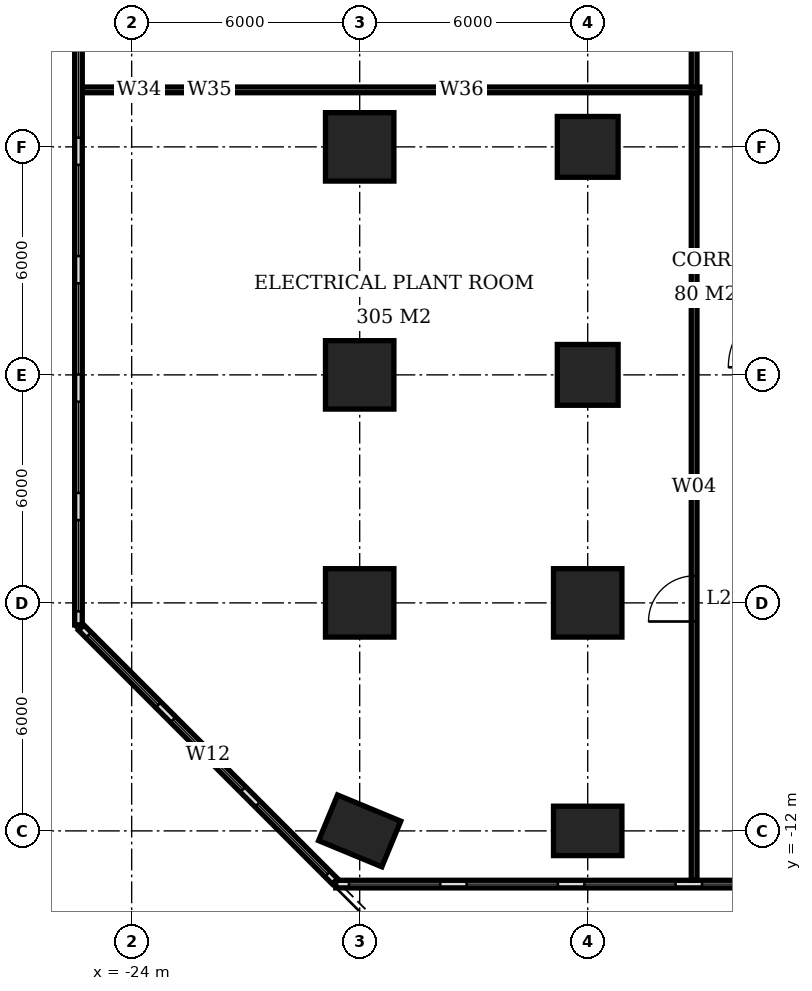
"""IFC4 building model, lengths in metres.
Left out: names, types, materials, properties, quantities, classifications, styles, units other than length and angle.
Written with IfcOpenShell. Run it as: python <this file> out.ifc"""

import sys

from ifc_helpers import new_model, si_unit, direction, frame, frame_2d, origin, origin_2d, place, context, subcontext, project, spatial, rectangle, extrude, element, fill, save


model = new_model("IFC4")
c1 = context("Model", 3, precision=1e-05, world=origin(), true_north=direction((0.0, 1.0)))
c2 = subcontext(c1, "Body", "Model", "MODEL_VIEW")
j1 = project(units=[si_unit("LENGTHUNIT", "METRE"), si_unit("PLANEANGLEUNIT", "RADIAN")], contexts=[c1])
p1 = place(None, origin())
s1 = spatial("IfcSite", under=j1, at=p1, CompositionType="ELEMENT")
p2 = place(p1, origin())
s2 = spatial("IfcBuilding", under=s1, at=p2, CompositionType="ELEMENT")
p3 = place(p2, frame((0.0, 0.0, 88.4)))
s3 = spatial("IfcBuildingStorey", under=s2, at=p3, CompositionType="ELEMENT", Elevation=88.4)
p4 = place(p3, frame((-18.0, -12.0, 0.0), z_axis=(0.0, 0.0, 1.0), x_axis=(-0.923879532511, 0.382683432365, 0.0)))
e1 = element("IfcColumn", 1, at=p4, inside=s3, PredefinedType="COLUMN", context=c2, shape_type="SweptSolid", body=[
    extrude(rectangle(XDim=1.8, YDim=1.3, at=origin_2d()), origin(), (0.0, 0.0, 1.0), 5.4),
])
for number, where, z_axis, x_axis in (
    (2, (-18.0, -6.0, 0.0), (0.0, 0.0, 1.0), (1.0, 0.0, 0.0)),
    (3, (-18.0, 0.0, 0.0), (0.0, 0.0, 1.0), (1.0, 0.0, 0.0)),
    (4, (-18.0, 6.0, 0.0), (0.0, 0.0, 1.0), (1.0, 0.0, 0.0)),
):
    element("IfcColumn", number, at=place(p3, frame(where, z_axis=z_axis, x_axis=x_axis)), inside=s3, PredefinedType="COLUMN", context=c2, shape_type="SweptSolid", body=[
        extrude(rectangle(XDim=1.8, YDim=1.8, at=origin_2d()), origin(), (0.0, 0.0, 1.0), 5.4),
    ])
p5 = place(p3, frame((-12.0, -12.0, 0.0), z_axis=(0.0, 0.0, 1.0), x_axis=(1.0, 0.0, 0.0)))
e5 = element("IfcColumn", 5, at=p5, inside=s3, PredefinedType="COLUMN", context=c2, shape_type="SweptSolid", body=[
    extrude(rectangle(XDim=1.8, YDim=1.3, at=origin_2d()), origin(), (0.0, 0.0, 1.0), 5.4),
])
p6 = place(p3, frame((-12.0, -6.0, 0.0), z_axis=(0.0, 0.0, 1.0), x_axis=(1.0, 0.0, 0.0)))
e6 = element("IfcColumn", 6, at=p6, inside=s3, PredefinedType="COLUMN", context=c2, shape_type="SweptSolid", body=[
    extrude(rectangle(XDim=1.8, YDim=1.8, at=origin_2d()), origin(), (0.0, 0.0, 1.0), 5.4),
])
for number, where, z_axis, x_axis in (
    (7, (-12.0, 0.0, 0.0), (0.0, 0.0, 1.0), (1.0, 0.0, 0.0)),
    (8, (-12.0, 6.0, 0.0), (0.0, 0.0, 1.0), (1.0, 0.0, 0.0)),
):
    element("IfcColumn", number, at=place(p3, frame(where, z_axis=z_axis, x_axis=x_axis)), inside=s3, PredefinedType="COLUMN", context=c2, shape_type="SweptSolid", body=[
        extrude(rectangle(XDim=1.6, YDim=1.6, at=origin_2d()), origin(), (0.0, 0.0, 1.0), 5.4),
    ])
p7 = place(p3, frame((-18.63, -13.4, 0.0), z_axis=(0.0, 0.0, 1.0), x_axis=(1.0, 0.0, 0.0)))
e9 = element("IfcWall", 9, at=p7, inside=s3, PredefinedType="USERDEFINED", context=c2, shape_type="SweptSolid", body=[
    extrude(rectangle(XDim=37.26, YDim=0.2, at=frame_2d((18.63, 0.0))), origin(), (0.0, 0.0, 1.0), 5.4),
])
p8 = place(p7, frame((0.348, 0.0, 0.6)))
e10 = element("IfcOpeningElement", 10, at=p8, cuts=e9, PredefinedType="OPENING", context=c2, shape_type="SweptSolid", body=[
    extrude(rectangle(XDim=2.4, YDim=3.0, at=frame_2d((1.2, 1.5))), frame((0.0, 0.11, 0.0), z_axis=(0.0, -1.0, 0.0), x_axis=(1.0, 0.0, 0.0)), (0.0, 0.0, 1.0), 0.22),
])
p9 = place(p7, frame((3.445, 0.0, 0.6)))
e11 = element("IfcOpeningElement", 11, at=p9, cuts=e9, PredefinedType="OPENING", context=c2, shape_type="SweptSolid", body=[
    extrude(rectangle(XDim=2.4, YDim=3.0, at=frame_2d((1.2, 1.5))), frame((0.0, 0.11, 0.0), z_axis=(0.0, -1.0, 0.0), x_axis=(1.0, 0.0, 0.0)), (0.0, 0.0, 1.0), 0.22),
])
p10 = place(p7, frame((6.542, 0.0, 0.6)))
e12 = element("IfcOpeningElement", 12, at=p10, cuts=e9, PredefinedType="OPENING", context=c2, shape_type="SweptSolid", body=[
    extrude(rectangle(XDim=2.4, YDim=3.0, at=frame_2d((1.2, 1.5))), frame((0.0, 0.11, 0.0), z_axis=(0.0, -1.0, 0.0), x_axis=(1.0, 0.0, 0.0)), (0.0, 0.0, 1.0), 0.22),
])
p11 = place(p7, frame((9.638, 0.0, 0.6)))
e13 = element("IfcOpeningElement", 13, at=p11, cuts=e9, PredefinedType="OPENING", context=c2, shape_type="SweptSolid", body=[
    extrude(rectangle(XDim=2.4, YDim=3.0, at=frame_2d((1.2, 1.5))), frame((0.0, 0.11, 0.0), z_axis=(0.0, -1.0, 0.0), x_axis=(1.0, 0.0, 0.0)), (0.0, 0.0, 1.0), 0.22),
])
p12 = place(p7, frame((12.735, 0.0, 0.6)))
e14 = element("IfcOpeningElement", 14, at=p12, cuts=e9, PredefinedType="OPENING", context=c2, shape_type="SweptSolid", body=[
    extrude(rectangle(XDim=2.4, YDim=3.0, at=frame_2d((1.2, 1.5))), frame((0.0, 0.11, 0.0), z_axis=(0.0, -1.0, 0.0), x_axis=(1.0, 0.0, 0.0)), (0.0, 0.0, 1.0), 0.22),
])
p13 = place(p7, frame((16.582, 0.0, 0.0)))
e15 = element("IfcOpeningElement", 15, at=p13, cuts=e9, PredefinedType="OPENING", context=c2, shape_type="SweptSolid", body=[
    extrude(rectangle(XDim=1.0, YDim=2.1, at=frame_2d((0.5, 1.05))), frame((0.0, 0.11, 0.0), z_axis=(0.0, -1.0, 0.0), x_axis=(1.0, 0.0, 0.0)), (0.0, 0.0, 1.0), 0.22),
])
p14 = place(p7, frame((18.928, 0.0, 0.6)))
e16 = element("IfcOpeningElement", 16, at=p14, cuts=e9, PredefinedType="OPENING", context=c2, shape_type="SweptSolid", body=[
    extrude(rectangle(XDim=2.4, YDim=3.0, at=frame_2d((1.2, 1.5))), frame((0.0, 0.11, 0.0), z_axis=(0.0, -1.0, 0.0), x_axis=(1.0, 0.0, 0.0)), (0.0, 0.0, 1.0), 0.22),
])
p15 = place(p7, frame((22.025, 0.0, 0.6)))
e17 = element("IfcOpeningElement", 17, at=p15, cuts=e9, PredefinedType="OPENING", context=c2, shape_type="SweptSolid", body=[
    extrude(rectangle(XDim=2.4, YDim=3.0, at=frame_2d((1.2, 1.5))), frame((0.0, 0.11, 0.0), z_axis=(0.0, -1.0, 0.0), x_axis=(1.0, 0.0, 0.0)), (0.0, 0.0, 1.0), 0.22),
])
p16 = place(p7, frame((25.122, 0.0, 0.6)))
e18 = element("IfcOpeningElement", 18, at=p16, cuts=e9, PredefinedType="OPENING", context=c2, shape_type="SweptSolid", body=[
    extrude(rectangle(XDim=2.4, YDim=3.0, at=frame_2d((1.2, 1.5))), frame((0.0, 0.11, 0.0), z_axis=(0.0, -1.0, 0.0), x_axis=(1.0, 0.0, 0.0)), (0.0, 0.0, 1.0), 0.22),
])
p17 = place(p7, frame((28.218, 0.0, 0.6)))
e19 = element("IfcOpeningElement", 19, at=p17, cuts=e9, PredefinedType="OPENING", context=c2, shape_type="SweptSolid", body=[
    extrude(rectangle(XDim=2.4, YDim=3.0, at=frame_2d((1.2, 1.5))), frame((0.0, 0.11, 0.0), z_axis=(0.0, -1.0, 0.0), x_axis=(1.0, 0.0, 0.0)), (0.0, 0.0, 1.0), 0.22),
])
p18 = place(p7, frame((31.315, 0.0, 0.6)))
e20 = element("IfcOpeningElement", 20, at=p18, cuts=e9, PredefinedType="OPENING", context=c2, shape_type="SweptSolid", body=[
    extrude(rectangle(XDim=2.4, YDim=3.0, at=frame_2d((1.2, 1.5))), frame((0.0, 0.11, 0.0), z_axis=(0.0, -1.0, 0.0), x_axis=(1.0, 0.0, 0.0)), (0.0, 0.0, 1.0), 0.22),
])
p19 = place(p7, frame((34.412, 0.0, 0.6)))
e21 = element("IfcOpeningElement", 21, at=p19, cuts=e9, PredefinedType="OPENING", context=c2, shape_type="SweptSolid", body=[
    extrude(rectangle(XDim=2.4, YDim=3.0, at=frame_2d((1.2, 1.5))), frame((0.0, 0.11, 0.0), z_axis=(0.0, -1.0, 0.0), x_axis=(1.0, 0.0, 0.0)), (0.0, 0.0, 1.0), 0.22),
])
p20 = place(p3, frame((-25.4, 24.58, 0.0), z_axis=(0.0, 0.0, 1.0), x_axis=(0.0, -1.0, 0.0)))
e22 = element("IfcWall", 22, at=p20, inside=s3, PredefinedType="USERDEFINED", context=c2, shape_type="SweptSolid", body=[
    extrude(rectangle(XDim=31.16, YDim=0.2, at=frame_2d((15.58, 0.0))), origin(), (0.0, 0.0, 1.0), 5.4),
])
p21 = place(p20, frame((0.358, 0.0, 0.6)))
e23 = element("IfcOpeningElement", 23, at=p21, cuts=e22, PredefinedType="OPENING", context=c2, shape_type="SweptSolid", body=[
    extrude(rectangle(XDim=2.4, YDim=3.0, at=frame_2d((1.2, 1.5))), frame((0.0, 0.11, 0.0), z_axis=(0.0, -1.0, 0.0), x_axis=(1.0, 0.0, 0.0)), (0.0, 0.0, 1.0), 0.22),
])
p22 = place(p20, frame((3.474, 0.0, 0.6)))
e24 = element("IfcOpeningElement", 24, at=p22, cuts=e22, PredefinedType="OPENING", context=c2, shape_type="SweptSolid", body=[
    extrude(rectangle(XDim=2.4, YDim=3.0, at=frame_2d((1.2, 1.5))), frame((0.0, 0.11, 0.0), z_axis=(0.0, -1.0, 0.0), x_axis=(1.0, 0.0, 0.0)), (0.0, 0.0, 1.0), 0.22),
])
p23 = place(p20, frame((6.59, 0.0, 0.6)))
e25 = element("IfcOpeningElement", 25, at=p23, cuts=e22, PredefinedType="OPENING", context=c2, shape_type="SweptSolid", body=[
    extrude(rectangle(XDim=2.4, YDim=3.0, at=frame_2d((1.2, 1.5))), frame((0.0, 0.11, 0.0), z_axis=(0.0, -1.0, 0.0), x_axis=(1.0, 0.0, 0.0)), (0.0, 0.0, 1.0), 0.22),
])
p24 = place(p20, frame((9.706, 0.0, 0.6)))
e26 = element("IfcOpeningElement", 26, at=p24, cuts=e22, PredefinedType="OPENING", context=c2, shape_type="SweptSolid", body=[
    extrude(rectangle(XDim=2.4, YDim=3.0, at=frame_2d((1.2, 1.5))), frame((0.0, 0.11, 0.0), z_axis=(0.0, -1.0, 0.0), x_axis=(1.0, 0.0, 0.0)), (0.0, 0.0, 1.0), 0.22),
])
p25 = place(p20, frame((12.822, 0.0, 0.6)))
e27 = element("IfcOpeningElement", 27, at=p25, cuts=e22, PredefinedType="OPENING", context=c2, shape_type="SweptSolid", body=[
    extrude(rectangle(XDim=2.4, YDim=3.0, at=frame_2d((1.2, 1.5))), frame((0.0, 0.11, 0.0), z_axis=(0.0, -1.0, 0.0), x_axis=(1.0, 0.0, 0.0)), (0.0, 0.0, 1.0), 0.22),
])
p26 = place(p20, frame((15.938, 0.0, 0.6)))
e28 = element("IfcOpeningElement", 28, at=p26, cuts=e22, PredefinedType="OPENING", context=c2, shape_type="SweptSolid", body=[
    extrude(rectangle(XDim=2.4, YDim=3.0, at=frame_2d((1.2, 1.5))), frame((0.0, 0.11, 0.0), z_axis=(0.0, -1.0, 0.0), x_axis=(1.0, 0.0, 0.0)), (0.0, 0.0, 1.0), 0.22),
])
p27 = place(p20, frame((19.054, 0.0, 0.6)))
e29 = element("IfcOpeningElement", 29, at=p27, cuts=e22, PredefinedType="OPENING", context=c2, shape_type="SweptSolid", body=[
    extrude(rectangle(XDim=2.4, YDim=3.0, at=frame_2d((1.2, 1.5))), frame((0.0, 0.11, 0.0), z_axis=(0.0, -1.0, 0.0), x_axis=(1.0, 0.0, 0.0)), (0.0, 0.0, 1.0), 0.22),
])
p28 = place(p20, frame((22.17, 0.0, 0.6)))
e30 = element("IfcOpeningElement", 30, at=p28, cuts=e22, PredefinedType="OPENING", context=c2, shape_type="SweptSolid", body=[
    extrude(rectangle(XDim=2.4, YDim=3.0, at=frame_2d((1.2, 1.5))), frame((0.0, 0.11, 0.0), z_axis=(0.0, -1.0, 0.0), x_axis=(1.0, 0.0, 0.0)), (0.0, 0.0, 1.0), 0.22),
])
p29 = place(p20, frame((25.286, 0.0, 0.6)))
e31 = element("IfcOpeningElement", 31, at=p29, cuts=e22, PredefinedType="OPENING", context=c2, shape_type="SweptSolid", body=[
    extrude(rectangle(XDim=2.4, YDim=3.0, at=frame_2d((1.2, 1.5))), frame((0.0, 0.11, 0.0), z_axis=(0.0, -1.0, 0.0), x_axis=(1.0, 0.0, 0.0)), (0.0, 0.0, 1.0), 0.22),
])
p30 = place(p20, frame((28.402, 0.0, 0.6)))
e32 = element("IfcOpeningElement", 32, at=p30, cuts=e22, PredefinedType="OPENING", context=c2, shape_type="SweptSolid", body=[
    extrude(rectangle(XDim=2.4, YDim=3.0, at=frame_2d((1.2, 1.5))), frame((0.0, 0.11, 0.0), z_axis=(0.0, -1.0, 0.0), x_axis=(1.0, 0.0, 0.0)), (0.0, 0.0, 1.0), 0.22),
])
p31 = place(p3, frame((-25.329, -6.651, 0.0), z_axis=(0.0, 0.0, 1.0), x_axis=(0.707106781187, -0.707106781187, 0.0)))
e33 = element("IfcWall", 33, at=p31, inside=s3, PredefinedType="USERDEFINED", context=c2, shape_type="SweptSolid", body=[
    extrude(rectangle(XDim=9.445, YDim=0.2, at=frame_2d((4.723, 0.0))), origin(), (0.0, 0.0, 1.0), 5.4),
])
p32 = place(p31, frame((0.274, 0.0, 0.6)))
e34 = element("IfcOpeningElement", 34, at=p32, cuts=e33, PredefinedType="OPENING", context=c2, shape_type="SweptSolid", body=[
    extrude(rectangle(XDim=2.6, YDim=3.0, at=frame_2d((1.3, 1.5))), frame((0.0, 0.11, 0.0), z_axis=(0.0, -1.0, 0.0), x_axis=(1.0, 0.0, 0.0)), (0.0, 0.0, 1.0), 0.22),
])
p33 = place(p31, frame((3.423, 0.0, 0.6)))
e35 = element("IfcOpeningElement", 35, at=p33, cuts=e33, PredefinedType="OPENING", context=c2, shape_type="SweptSolid", body=[
    extrude(rectangle(XDim=2.6, YDim=3.0, at=frame_2d((1.3, 1.5))), frame((0.0, 0.11, 0.0), z_axis=(0.0, -1.0, 0.0), x_axis=(1.0, 0.0, 0.0)), (0.0, 0.0, 1.0), 0.22),
])
p34 = place(p31, frame((6.571, 0.0, 0.6)))
e36 = element("IfcOpeningElement", 36, at=p34, cuts=e33, PredefinedType="OPENING", context=c2, shape_type="SweptSolid", body=[
    extrude(rectangle(XDim=2.6, YDim=3.0, at=frame_2d((1.3, 1.5))), frame((0.0, 0.11, 0.0), z_axis=(0.0, -1.0, 0.0), x_axis=(1.0, 0.0, 0.0)), (0.0, 0.0, 1.0), 0.22),
])
p35 = place(p3, frame((-25.3, 7.5, 0.0), z_axis=(0.0, 0.0, 1.0), x_axis=(1.0, 0.0, 0.0)))
e37 = element("IfcWall", 37, at=p35, inside=s3, PredefinedType="PARTITIONING", context=c2, shape_type="SweptSolid", body=[
    extrude(rectangle(XDim=2.99, YDim=0.15, at=frame_2d((1.495, 0.0))), origin(), (0.0, 0.0, 1.0), 5.15),
])
p36 = place(p3, frame((-22.31, 7.5, 0.0), z_axis=(0.0, 0.0, 1.0), x_axis=(1.0, 0.0, 0.0)))
e38 = element("IfcWall", 38, at=p36, inside=s3, PredefinedType="PARTITIONING", context=c2, shape_type="SweptSolid", body=[
    extrude(rectangle(XDim=0.72, YDim=0.15, at=frame_2d((0.36, 0.0))), origin(), (0.0, 0.0, 1.0), 4.15),
])
p37 = place(p3, frame((-21.59, 7.5, 0.0), z_axis=(0.0, 0.0, 1.0), x_axis=(1.0, 0.0, 0.0)))
e39 = element("IfcWall", 39, at=p37, inside=s3, PredefinedType="PARTITIONING", context=c2, shape_type="SweptSolid", body=[
    extrude(rectangle(XDim=12.54, YDim=0.15, at=frame_2d((6.27, 0.0))), origin(), (0.0, 0.0, 1.0), 5.15),
])
p38 = place(p3, frame((-9.2, -13.3, 0.0), z_axis=(0.0, 0.0, 1.0), x_axis=(0.0, 1.0, 0.0)))
e40 = element("IfcWall", 40, at=p38, inside=s3, PredefinedType="PARTITIONING", context=c2, shape_type="SweptSolid", body=[
    extrude(rectangle(XDim=20.725, YDim=0.15, at=frame_2d((10.363, 0.0))), origin(), (0.0, 0.0, 1.0), 5.15),
])
p39 = place(p38, frame((6.81, 0.0, 0.0)))
e41 = element("IfcOpeningElement", 41, at=p39, cuts=e40, PredefinedType="OPENING", context=c2, shape_type="SweptSolid", body=[
    extrude(rectangle(XDim=1.2, YDim=2.4, at=frame_2d((0.6, 1.2))), frame((0.0, 0.085, 0.0), z_axis=(0.0, -1.0, 0.0), x_axis=(1.0, 0.0, 0.0)), (0.0, 0.0, 1.0), 0.17),
])
p40 = place(p3, frame((-9.2, 7.575, 0.0), z_axis=(0.0, 0.0, 1.0), x_axis=(0.0, 1.0, 0.0)))
e42 = element("IfcWall", 42, at=p40, inside=s3, PredefinedType="PARTITIONING", context=c2, shape_type="SweptSolid", body=[
    extrude(rectangle(XDim=11.85, YDim=0.15, at=frame_2d((5.925, 0.0))), origin(), (0.0, 0.0, 1.0), 5.15),
])
p41 = place(p40, frame((3.525, 0.0, 0.0)))
e43 = element("IfcOpeningElement", 43, at=p41, cuts=e42, PredefinedType="OPENING", context=c2, shape_type="SweptSolid", body=[
    extrude(rectangle(XDim=1.2, YDim=2.4, at=frame_2d((0.6, 1.2))), frame((0.0, 0.085, 0.0), z_axis=(0.0, -1.0, 0.0), x_axis=(1.0, 0.0, 0.0)), (0.0, 0.0, 1.0), 0.17),
])
p42 = place(p8, origin())
e44 = element("IfcWindow", 44, at=p42, inside=s3, PartitioningType="SINGLE_PANEL", PredefinedType="USERDEFINED", context=c2, shape_type="SweptSolid", body=[
    extrude(rectangle(XDim=2.4, YDim=3.0, at=frame_2d((1.2, 1.5))), frame((0.0, 0.03, 0.0), z_axis=(0.0, -1.0, 0.0), x_axis=(1.0, 0.0, 0.0)), (0.0, 0.0, 1.0), 0.06),
])
fill(e10, e44)
p43 = place(p9, origin())
e45 = element("IfcWindow", 45, at=p43, inside=s3, PartitioningType="SINGLE_PANEL", PredefinedType="USERDEFINED", context=c2, shape_type="SweptSolid", body=[
    extrude(rectangle(XDim=2.4, YDim=3.0, at=frame_2d((1.2, 1.5))), frame((0.0, 0.03, 0.0), z_axis=(0.0, -1.0, 0.0), x_axis=(1.0, 0.0, 0.0)), (0.0, 0.0, 1.0), 0.06),
])
fill(e11, e45)
p44 = place(p10, origin())
e46 = element("IfcWindow", 46, at=p44, inside=s3, PartitioningType="SINGLE_PANEL", PredefinedType="USERDEFINED", context=c2, shape_type="SweptSolid", body=[
    extrude(rectangle(XDim=2.4, YDim=3.0, at=frame_2d((1.2, 1.5))), frame((0.0, 0.03, 0.0), z_axis=(0.0, -1.0, 0.0), x_axis=(1.0, 0.0, 0.0)), (0.0, 0.0, 1.0), 0.06),
])
fill(e12, e46)
p45 = place(p11, origin())
e47 = element("IfcWindow", 47, at=p45, inside=s3, PartitioningType="SINGLE_PANEL", PredefinedType="USERDEFINED", context=c2, shape_type="SweptSolid", body=[
    extrude(rectangle(XDim=2.4, YDim=3.0, at=frame_2d((1.2, 1.5))), frame((0.0, 0.03, 0.0), z_axis=(0.0, -1.0, 0.0), x_axis=(1.0, 0.0, 0.0)), (0.0, 0.0, 1.0), 0.06),
])
fill(e13, e47)
p46 = place(p26, origin())
e48 = element("IfcWindow", 48, at=p46, inside=s3, PartitioningType="SINGLE_PANEL", PredefinedType="USERDEFINED", context=c2, shape_type="SweptSolid", body=[
    extrude(rectangle(XDim=2.4, YDim=3.0, at=frame_2d((1.2, 1.5))), frame((0.0, 0.03, 0.0), z_axis=(0.0, -1.0, 0.0), x_axis=(1.0, 0.0, 0.0)), (0.0, 0.0, 1.0), 0.06),
])
fill(e28, e48)
p47 = place(p27, origin())
e49 = element("IfcWindow", 49, at=p47, inside=s3, PartitioningType="SINGLE_PANEL", PredefinedType="USERDEFINED", context=c2, shape_type="SweptSolid", body=[
    extrude(rectangle(XDim=2.4, YDim=3.0, at=frame_2d((1.2, 1.5))), frame((0.0, 0.03, 0.0), z_axis=(0.0, -1.0, 0.0), x_axis=(1.0, 0.0, 0.0)), (0.0, 0.0, 1.0), 0.06),
])
fill(e29, e49)
p48 = place(p28, origin())
e50 = element("IfcWindow", 50, at=p48, inside=s3, PartitioningType="SINGLE_PANEL", PredefinedType="USERDEFINED", context=c2, shape_type="SweptSolid", body=[
    extrude(rectangle(XDim=2.4, YDim=3.0, at=frame_2d((1.2, 1.5))), frame((0.0, 0.03, 0.0), z_axis=(0.0, -1.0, 0.0), x_axis=(1.0, 0.0, 0.0)), (0.0, 0.0, 1.0), 0.06),
])
fill(e30, e50)
p49 = place(p29, origin())
e51 = element("IfcWindow", 51, at=p49, inside=s3, PartitioningType="SINGLE_PANEL", PredefinedType="USERDEFINED", context=c2, shape_type="SweptSolid", body=[
    extrude(rectangle(XDim=2.4, YDim=3.0, at=frame_2d((1.2, 1.5))), frame((0.0, 0.03, 0.0), z_axis=(0.0, -1.0, 0.0), x_axis=(1.0, 0.0, 0.0)), (0.0, 0.0, 1.0), 0.06),
])
fill(e31, e51)
p50 = place(p30, origin())
e52 = element("IfcWindow", 52, at=p50, inside=s3, PartitioningType="SINGLE_PANEL", PredefinedType="USERDEFINED", context=c2, shape_type="SweptSolid", body=[
    extrude(rectangle(XDim=2.4, YDim=3.0, at=frame_2d((1.2, 1.5))), frame((0.0, 0.03, 0.0), z_axis=(0.0, -1.0, 0.0), x_axis=(1.0, 0.0, 0.0)), (0.0, 0.0, 1.0), 0.06),
])
fill(e32, e52)
p51 = place(p32, origin())
e53 = element("IfcWindow", 53, at=p51, inside=s3, PartitioningType="SINGLE_PANEL", PredefinedType="USERDEFINED", context=c2, shape_type="SweptSolid", body=[
    extrude(rectangle(XDim=2.6, YDim=3.0, at=frame_2d((1.3, 1.5))), frame((0.0, 0.03, 0.0), z_axis=(0.0, -1.0, 0.0), x_axis=(1.0, 0.0, 0.0)), (0.0, 0.0, 1.0), 0.06),
])
fill(e34, e53)
p52 = place(p33, origin())
e54 = element("IfcWindow", 54, at=p52, inside=s3, PartitioningType="SINGLE_PANEL", PredefinedType="USERDEFINED", context=c2, shape_type="SweptSolid", body=[
    extrude(rectangle(XDim=2.6, YDim=3.0, at=frame_2d((1.3, 1.5))), frame((0.0, 0.03, 0.0), z_axis=(0.0, -1.0, 0.0), x_axis=(1.0, 0.0, 0.0)), (0.0, 0.0, 1.0), 0.06),
])
fill(e35, e54)
p53 = place(p34, origin())
e55 = element("IfcWindow", 55, at=p53, inside=s3, PartitioningType="SINGLE_PANEL", PredefinedType="USERDEFINED", context=c2, shape_type="SweptSolid", body=[
    extrude(rectangle(XDim=2.6, YDim=3.0, at=frame_2d((1.3, 1.5))), frame((0.0, 0.03, 0.0), z_axis=(0.0, -1.0, 0.0), x_axis=(1.0, 0.0, 0.0)), (0.0, 0.0, 1.0), 0.06),
])
fill(e36, e55)
p54 = place(p39, origin())
e56 = element("IfcDoor", 56, at=p54, inside=s3, OperationType="SINGLE_SWING_LEFT", PredefinedType="DOOR", context=c2, shape_type="SweptSolid", body=[
    extrude(rectangle(XDim=1.2, YDim=2.4, at=frame_2d((0.6, 1.2))), frame((0.0, 0.025, 0.0), z_axis=(0.0, -1.0, 0.0), x_axis=(1.0, 0.0, 0.0)), (0.0, 0.0, 1.0), 0.05),
])
fill(e41, e56)
save(model, sys.argv[1])
